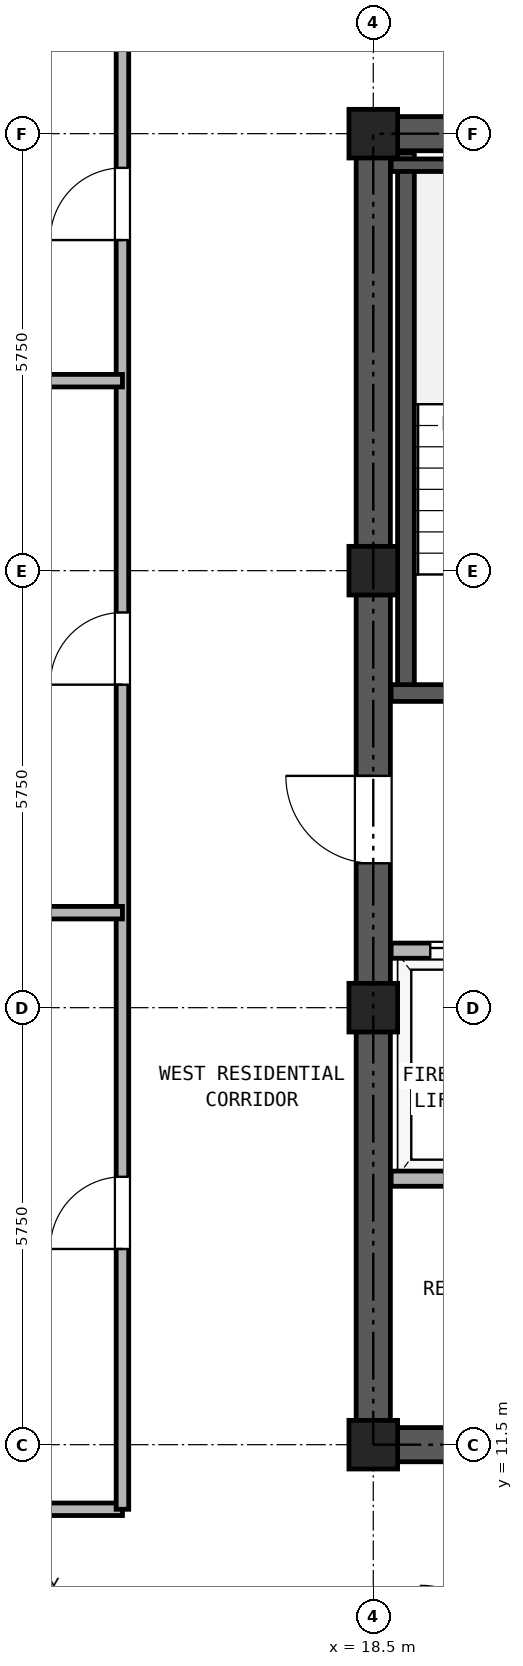
"""IFC4 building model, lengths in metres.
Left out: names, types, materials, properties, quantities, classifications, styles, units other than length and angle.
Written with IfcOpenShell. Run it as: python <this file> out.ifc"""

import sys

from ifc_helpers import new_model, si_unit, direction, frame, frame_2d, origin, origin_2d, place, context, subcontext, project, spatial, rectangle, hollow_rectangle, extrude, source, transform, mapped, element, fill, save


model = new_model("IFC4")
c1 = context("Model", 3, precision=1e-05, world=origin(), true_north=direction((0.0, 1.0)))
c2 = subcontext(c1, "Body", "Model", "MODEL_VIEW")
j1 = project(units=[si_unit("LENGTHUNIT", "METRE"), si_unit("PLANEANGLEUNIT", "RADIAN")], contexts=[c1])
p1 = place(None, origin())
s1 = spatial("IfcSite", under=j1, at=p1, CompositionType="ELEMENT")
p2 = place(p1, origin())
s2 = spatial("IfcBuilding", under=s1, at=p2, CompositionType="ELEMENT")
p3 = place(p2, frame((0.0, 0.0, 165.7)))
s3 = spatial("IfcBuildingStorey", under=s2, at=p3, CompositionType="ELEMENT", Elevation=165.7)
m1 = source(origin(), c2, "Body", "SweptSolid", [
    extrude(hollow_rectangle(XDim=0.64, YDim=0.64, WallThickness=0.035, at=origin_2d()), origin(), (0.0, 0.0, 1.0), 2.95),
])
for number, where, z_axis, x_axis in (
    (1, (18.5, 11.5, 0.0), (0.0, 0.0, 1.0), (1.0, 0.0, 0.0)),
    (2, (18.5, 17.25, 0.0), (0.0, 0.0, 1.0), (1.0, 0.0, 0.0)),
    (3, (18.5, 23.0, 0.0), (0.0, 0.0, 1.0), (1.0, 0.0, 0.0)),
    (4, (18.5, 28.75, 0.0), (0.0, 0.0, 1.0), (1.0, 0.0, 0.0)),
):
    element("IfcColumn", number, at=place(p3, frame(where, z_axis=z_axis, x_axis=x_axis)), inside=s3, PredefinedType="COLUMN", context=c2, shape_type="MappedRepresentation", body=[
        mapped(m1, transform((0.0, 0.0, 0.0), x_axis=(1.0, 0.0, 0.0), y_axis=(0.0, 1.0, 0.0), z_axis=(0.0, 0.0, 1.0), scale=1.0)),
    ])
p4 = place(p3, frame((18.275, 11.5, 0.0), z_axis=(0.0, 0.0, 1.0), x_axis=(1.0, 0.0, 0.0)))
e5 = element("IfcWall", 5, at=p4, inside=s3, PredefinedType="SHEAR", context=c2, shape_type="SweptSolid", body=[
    extrude(rectangle(XDim=10.45, YDim=0.45, at=frame_2d((5.225, 0.0))), origin(), (0.0, 0.0, 1.0), 2.95),
])
p5 = place(p4, frame((1.825, 0.0, 0.0)))
e6 = element("IfcOpeningElement", 6, at=p5, cuts=e5, PredefinedType="OPENING", context=c2, shape_type="SweptSolid", body=[
    extrude(rectangle(XDim=0.95, YDim=2.15, at=frame_2d((0.475, 1.075))), frame((0.0, 0.235, 0.0), z_axis=(0.0, -1.0, 0.0), x_axis=(1.0, 0.0, 0.0)), (0.0, 0.0, 1.0), 0.47),
])
p6 = place(p4, frame((5.325, 0.0, 0.0)))
e7 = element("IfcOpeningElement", 7, at=p6, cuts=e5, PredefinedType="OPENING", context=c2, shape_type="SweptSolid", body=[
    extrude(rectangle(XDim=0.95, YDim=2.15, at=frame_2d((0.475, 1.075))), frame((0.0, 0.235, 0.0), z_axis=(0.0, -1.0, 0.0), x_axis=(1.0, 0.0, 0.0)), (0.0, 0.0, 1.0), 0.47),
])
p7 = place(p4, frame((8.225, 0.0, 0.0)))
e8 = element("IfcOpeningElement", 8, at=p7, cuts=e5, PredefinedType="OPENING", context=c2, shape_type="SweptSolid", body=[
    extrude(rectangle(XDim=1.1, YDim=2.25, at=frame_2d((0.55, 1.125))), frame((0.0, 0.235, 0.0), z_axis=(0.0, -1.0, 0.0), x_axis=(1.0, 0.0, 0.0)), (0.0, 0.0, 1.0), 0.47),
])
p8 = place(p3, frame((18.275, 28.75, 0.0), z_axis=(0.0, 0.0, 1.0), x_axis=(1.0, 0.0, 0.0)))
e9 = element("IfcWall", 9, at=p8, inside=s3, PredefinedType="SHEAR", context=c2, shape_type="SweptSolid", body=[
    extrude(rectangle(XDim=10.45, YDim=0.45, at=frame_2d((5.225, 0.0))), origin(), (0.0, 0.0, 1.0), 2.95),
])
p9 = place(p8, frame((4.105, 0.0, 0.0)))
e10 = element("IfcOpeningElement", 10, at=p9, cuts=e9, PredefinedType="OPENING", context=c2, shape_type="SweptSolid", body=[
    extrude(rectangle(XDim=0.9, YDim=2.05, at=frame_2d((0.45, 1.025))), frame((0.0, 0.235, 0.0), z_axis=(0.0, -1.0, 0.0), x_axis=(1.0, 0.0, 0.0)), (0.0, 0.0, 1.0), 0.47),
])
p10 = place(p8, frame((5.645, 0.0, 0.0)))
e11 = element("IfcOpeningElement", 11, at=p10, cuts=e9, PredefinedType="OPENING", context=c2, shape_type="SweptSolid", body=[
    extrude(rectangle(XDim=0.9, YDim=2.05, at=frame_2d((0.45, 1.025))), frame((0.0, 0.235, 0.0), z_axis=(0.0, -1.0, 0.0), x_axis=(1.0, 0.0, 0.0)), (0.0, 0.0, 1.0), 0.47),
])
p11 = place(p3, frame((18.5, 11.725, 0.0), z_axis=(0.0, 0.0, 1.0), x_axis=(0.0, 1.0, 0.0)))
e12 = element("IfcWall", 12, at=p11, inside=s3, PredefinedType="SHEAR", context=c2, shape_type="SweptSolid", body=[
    extrude(rectangle(XDim=16.8, YDim=0.45, at=frame_2d((8.4, 0.0))), origin(), (0.0, 0.0, 1.0), 2.95),
])
p12 = place(p11, frame((7.425, 0.0, 0.0)))
e13 = element("IfcOpeningElement", 13, at=p12, cuts=e12, PredefinedType="OPENING", context=c2, shape_type="SweptSolid", body=[
    extrude(rectangle(XDim=1.15, YDim=2.2, at=frame_2d((0.575, 1.1))), frame((0.0, 0.235, 0.0), z_axis=(0.0, -1.0, 0.0), x_axis=(1.0, 0.0, 0.0)), (0.0, 0.0, 1.0), 0.47),
])
p13 = place(p3, frame((18.93, 21.39, 0.0), z_axis=(0.0, 0.0, 1.0), x_axis=(0.0, 1.0, 0.0)))
e14 = element("IfcWall", 14, at=p13, inside=s3, PredefinedType="SOLIDWALL", context=c2, shape_type="SweptSolid", body=[
    extrude(rectangle(XDim=7.11, YDim=0.22, at=frame_2d((3.555, 0.0))), origin(), (0.0, 0.0, 1.0), 2.95),
])
p14 = place(p3, frame((18.735, 28.335, 0.0), z_axis=(0.0, 0.0, 1.0), x_axis=(1.0, 0.0, 0.0)))
e15 = element("IfcWall", 15, at=p14, inside=s3, PredefinedType="PARTITIONING", context=c2, shape_type="SweptSolid", body=[
    extrude(rectangle(XDim=3.375, YDim=0.165, at=frame_2d((1.688, 0.0))), origin(), (0.0, 0.0, 1.0), 2.95),
])
p15 = place(p3, frame((18.735, 21.39, 0.0), z_axis=(0.0, 0.0, 1.0), x_axis=(1.0, 0.0, 0.0)))
e16 = element("IfcWall", 16, at=p15, inside=s3, PredefinedType="SOLIDWALL", context=c2, shape_type="SweptSolid", body=[
    extrude(rectangle(XDim=6.395, YDim=0.22, at=frame_2d((3.197, 0.0))), origin(), (0.0, 0.0, 1.0), 2.95),
])
p16 = place(p15, frame((1.115, 0.0, 0.0)))
e17 = element("IfcOpeningElement", 17, at=p16, cuts=e16, PredefinedType="OPENING", context=c2, shape_type="SweptSolid", body=[
    extrude(rectangle(XDim=1.15, YDim=2.2, at=frame_2d((0.575, 1.1))), frame((0.0, 0.12, 0.0), z_axis=(0.0, -1.0, 0.0), x_axis=(1.0, 0.0, 0.0)), (0.0, 0.0, 1.0), 0.24),
])
p17 = place(p15, frame((4.845, 0.0, 0.0)))
e18 = element("IfcOpeningElement", 18, at=p17, cuts=e16, PredefinedType="OPENING", context=c2, shape_type="SweptSolid", body=[
    extrude(rectangle(XDim=1.1, YDim=2.25, at=frame_2d((0.55, 1.125))), frame((0.0, 0.12, 0.0), z_axis=(0.0, -1.0, 0.0), x_axis=(1.0, 0.0, 0.0)), (0.0, 0.0, 1.0), 0.24),
])
p18 = place(p3, frame((18.735, 18.0, 0.0), z_axis=(0.0, 0.0, 1.0), x_axis=(1.0, 0.0, 0.0)))
e19 = element("IfcWall", 19, at=p18, inside=s3, PredefinedType="PARTITIONING", context=c2, shape_type="SweptSolid", body=[
    extrude(rectangle(XDim=9.53, YDim=0.2, at=frame_2d((4.765, 0.0))), origin(), (0.0, 0.0, 1.0), 2.95),
])
p19 = place(p18, frame((0.515, 0.0, 0.0)))
e20 = element("IfcOpeningElement", 20, at=p19, cuts=e19, PredefinedType="OPENING", context=c2, shape_type="SweptSolid", body=[
    extrude(rectangle(XDim=1.3, YDim=2.3, at=frame_2d((0.65, 1.15))), frame((0.0, 0.11, 0.0), z_axis=(0.0, -1.0, 0.0), x_axis=(1.0, 0.0, 0.0)), (0.0, 0.0, 1.0), 0.22),
])
p20 = place(p18, frame((2.615, 0.0, 0.0)))
e21 = element("IfcOpeningElement", 21, at=p20, cuts=e19, PredefinedType="OPENING", context=c2, shape_type="SweptSolid", body=[
    extrude(rectangle(XDim=1.3, YDim=2.3, at=frame_2d((0.65, 1.15))), frame((0.0, 0.11, 0.0), z_axis=(0.0, -1.0, 0.0), x_axis=(1.0, 0.0, 0.0)), (0.0, 0.0, 1.0), 0.22),
])
p21 = place(p18, frame((5.035, 0.0, 0.0)))
e22 = element("IfcOpeningElement", 22, at=p21, cuts=e19, PredefinedType="OPENING", context=c2, shape_type="SweptSolid", body=[
    extrude(rectangle(XDim=0.9, YDim=2.05, at=frame_2d((0.45, 1.025))), frame((0.0, 0.11, 0.0), z_axis=(0.0, -1.0, 0.0), x_axis=(1.0, 0.0, 0.0)), (0.0, 0.0, 1.0), 0.22),
])
p22 = place(p18, frame((8.165, 0.0, 0.0)))
e23 = element("IfcOpeningElement", 23, at=p22, cuts=e19, PredefinedType="OPENING", context=c2, shape_type="SweptSolid", body=[
    extrude(rectangle(XDim=0.9, YDim=2.05, at=frame_2d((0.45, 1.025))), frame((0.0, 0.11, 0.0), z_axis=(0.0, -1.0, 0.0), x_axis=(1.0, 0.0, 0.0)), (0.0, 0.0, 1.0), 0.22),
])
p23 = place(p3, frame((18.735, 15.0, 0.0), z_axis=(0.0, 0.0, 1.0), x_axis=(1.0, 0.0, 0.0)))
e24 = element("IfcWall", 24, at=p23, inside=s3, PredefinedType="PARTITIONING", context=c2, shape_type="SweptSolid", body=[
    extrude(rectangle(XDim=9.53, YDim=0.2, at=frame_2d((4.765, 0.0))), origin(), (0.0, 0.0, 1.0), 2.95),
])
p24 = place(p3, frame((7.6, 10.65, 0.0), z_axis=(0.0, 0.0, 1.0), x_axis=(1.0, 0.0, 0.0)))
e25 = element("IfcWall", 25, at=p24, inside=s3, PredefinedType="PARTITIONING", context=c2, shape_type="SweptSolid", body=[
    extrude(rectangle(XDim=7.6, YDim=0.165, at=frame_2d((3.8, 0.0))), origin(), (0.0, 0.0, 1.0), 2.95),
])
p25 = place(p3, frame((15.2, 10.65, 0.0), z_axis=(0.0, 0.0, 1.0), x_axis=(0.0, 1.0, 0.0)))
e26 = element("IfcWall", 26, at=p25, inside=s3, PredefinedType="PARTITIONING", context=c2, shape_type="SweptSolid", body=[
    extrude(rectangle(XDim=24.49, YDim=0.165, at=frame_2d((12.245, 0.0))), origin(), (0.0, 0.0, 1.0), 2.95),
])
p26 = place(p25, frame((3.425, 0.0, 0.0)))
e27 = element("IfcOpeningElement", 27, at=p26, cuts=e26, PredefinedType="OPENING", context=c2, shape_type="SweptSolid", body=[
    extrude(rectangle(XDim=0.95, YDim=2.15, at=frame_2d((0.475, 1.075))), frame((0.0, 0.093, 0.0), z_axis=(0.0, -1.0, 0.0), x_axis=(1.0, 0.0, 0.0)), (0.0, 0.0, 1.0), 0.185),
])
p27 = place(p25, frame((10.85, 0.0, 0.0)))
e28 = element("IfcOpeningElement", 28, at=p27, cuts=e26, PredefinedType="OPENING", context=c2, shape_type="SweptSolid", body=[
    extrude(rectangle(XDim=0.95, YDim=2.15, at=frame_2d((0.475, 1.075))), frame((0.0, 0.093, 0.0), z_axis=(0.0, -1.0, 0.0), x_axis=(1.0, 0.0, 0.0)), (0.0, 0.0, 1.0), 0.185),
])
p28 = place(p25, frame((16.7, 0.0, 0.0)))
e29 = element("IfcOpeningElement", 29, at=p28, cuts=e26, PredefinedType="OPENING", context=c2, shape_type="SweptSolid", body=[
    extrude(rectangle(XDim=0.95, YDim=2.15, at=frame_2d((0.475, 1.075))), frame((0.0, 0.093, 0.0), z_axis=(0.0, -1.0, 0.0), x_axis=(1.0, 0.0, 0.0)), (0.0, 0.0, 1.0), 0.185),
])
p29 = place(p25, frame((21.52, 0.0, 0.0)))
e30 = element("IfcOpeningElement", 30, at=p29, cuts=e26, PredefinedType="OPENING", context=c2, shape_type="SweptSolid", body=[
    extrude(rectangle(XDim=0.92, YDim=2.1, at=frame_2d((0.46, 1.05))), frame((0.0, 0.093, 0.0), z_axis=(0.0, -1.0, 0.0), x_axis=(1.0, 0.0, 0.0)), (0.0, 0.0, 1.0), 0.185),
])
for number, where, z_axis, x_axis in (
    (31, (0.16, 18.5, 0.0), (0.0, 0.0, 1.0), (1.0, 0.0, 0.0)),
    (32, (0.16, 25.5, 0.0), (0.0, 0.0, 1.0), (1.0, 0.0, 0.0)),
):
    element("IfcWall", number, at=place(p3, frame(where, z_axis=z_axis, x_axis=x_axis)), inside=s3, PredefinedType="PARTITIONING", context=c2, shape_type="SweptSolid", body=[
        extrude(rectangle(XDim=15.04, YDim=0.165, at=frame_2d((7.52, 0.0))), origin(), (0.0, 0.0, 1.0), 2.95),
    ])
p30 = place(p19, origin())
e33 = element("IfcDoor", 33, at=p30, inside=s3, OperationType="DOUBLE_DOOR_SLIDING", PredefinedType="DOOR", context=c2, shape_type="SweptSolid", body=[
    extrude(rectangle(XDim=1.3, YDim=2.3, at=frame_2d((0.65, 1.15))), frame((0.0, 0.025, 0.0), z_axis=(0.0, -1.0, 0.0), x_axis=(1.0, 0.0, 0.0)), (0.0, 0.0, 1.0), 0.05),
])
fill(e20, e33)
p31 = place(p12, frame((1.15, 0.0, 0.0), z_axis=(0.0, 0.0, 1.0), x_axis=(-1.0, 0.0, 0.0)))
e34 = element("IfcDoor", 34, at=p31, inside=s3, OperationType="SINGLE_SWING_RIGHT", PredefinedType="DOOR", context=c2, shape_type="SweptSolid", body=[
    extrude(rectangle(XDim=1.15, YDim=2.2, at=frame_2d((0.575, 1.1))), frame((0.0, 0.025, 0.0), z_axis=(0.0, -1.0, 0.0), x_axis=(1.0, 0.0, 0.0)), (0.0, 0.0, 1.0), 0.05),
])
fill(e13, e34)
p32 = place(p26, frame((0.95, 0.0, 0.0), z_axis=(0.0, 0.0, 1.0), x_axis=(-1.0, 0.0, 0.0)))
e35 = element("IfcDoor", 35, at=p32, inside=s3, OperationType="SINGLE_SWING_LEFT", PredefinedType="DOOR", context=c2, shape_type="SweptSolid", body=[
    extrude(rectangle(XDim=0.95, YDim=2.15, at=frame_2d((0.475, 1.075))), frame((0.0, 0.025, 0.0), z_axis=(0.0, -1.0, 0.0), x_axis=(1.0, 0.0, 0.0)), (0.0, 0.0, 1.0), 0.05),
])
fill(e27, e35)
p33 = place(p27, frame((0.95, 0.0, 0.0), z_axis=(0.0, 0.0, 1.0), x_axis=(-1.0, 0.0, 0.0)))
e36 = element("IfcDoor", 36, at=p33, inside=s3, OperationType="SINGLE_SWING_LEFT", PredefinedType="DOOR", context=c2, shape_type="SweptSolid", body=[
    extrude(rectangle(XDim=0.95, YDim=2.15, at=frame_2d((0.475, 1.075))), frame((0.0, 0.025, 0.0), z_axis=(0.0, -1.0, 0.0), x_axis=(1.0, 0.0, 0.0)), (0.0, 0.0, 1.0), 0.05),
])
fill(e28, e36)
p34 = place(p28, frame((0.95, 0.0, 0.0), z_axis=(0.0, 0.0, 1.0), x_axis=(-1.0, 0.0, 0.0)))
e37 = element("IfcDoor", 37, at=p34, inside=s3, OperationType="SINGLE_SWING_LEFT", PredefinedType="DOOR", context=c2, shape_type="SweptSolid", body=[
    extrude(rectangle(XDim=0.95, YDim=2.15, at=frame_2d((0.475, 1.075))), frame((0.0, 0.025, 0.0), z_axis=(0.0, -1.0, 0.0), x_axis=(1.0, 0.0, 0.0)), (0.0, 0.0, 1.0), 0.05),
])
fill(e29, e37)
save(model, sys.argv[1])
